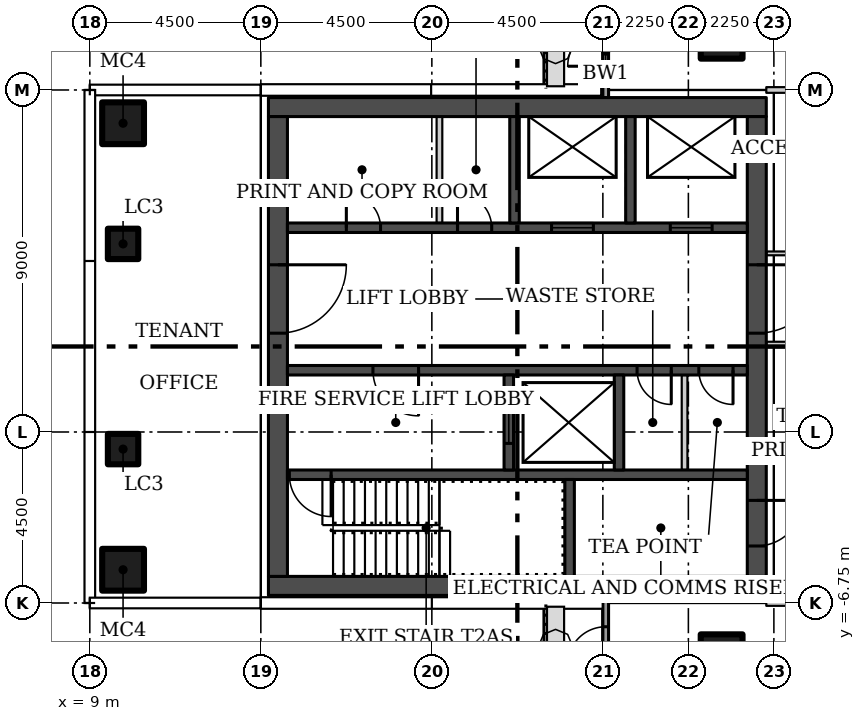
"""IFC4 building model, lengths in metres.
Left out: names, types, materials, properties, quantities, classifications, styles, units other than length and angle.
Written with IfcOpenShell. Run it as: python <this file> out.ifc"""

import sys

from ifc_helpers import new_model, si_unit, direction, frame, frame_2d, origin, origin_2d, place, context, subcontext, project, spatial, rectangle, hollow_rectangle, extrude, element, fill, save


model = new_model("IFC4")
c1 = context("Model", 3, precision=1e-05, world=origin(), true_north=direction((0.0, 1.0)))
c2 = subcontext(c1, "Body", "Model", "MODEL_VIEW")
j1 = project(units=[si_unit("LENGTHUNIT", "METRE"), si_unit("PLANEANGLEUNIT", "RADIAN")], contexts=[c1])
p1 = place(None, origin())
s1 = spatial("IfcSite", under=j1, at=p1, CompositionType="ELEMENT")
p2 = place(p1, origin())
s2 = spatial("IfcBuilding", under=s1, at=p2, CompositionType="ELEMENT")
p3 = place(p2, frame((0.0, 0.0, 170.1)))
s3 = spatial("IfcBuildingStorey", under=s2, at=p3, CompositionType="ELEMENT", Elevation=170.1)
for number, where in (
    (1, (25.625, 8.125, 0.0)),
    (2, (25.625, -8.125, 0.0)),
    (3, (9.875, -5.875, 0.0)),
    (4, (9.875, 5.875, 0.0)),
):
    element("IfcColumn", number, at=place(p3, frame(where)), inside=s3, PredefinedType="COLUMN", context=c2, shape_type="SweptSolid", body=[
        extrude(hollow_rectangle(XDim=1.1, YDim=1.1, WallThickness=0.04, at=origin_2d()), origin(), (0.0, 0.0, 1.0), 3.55),
    ])
for number, where in (
    (5, (9.875, -2.7, 0.0)),
    (6, (9.875, 2.7, 0.0)),
):
    element("IfcColumn", number, at=place(p3, frame(where)), inside=s3, PredefinedType="COLUMN", context=c2, shape_type="SweptSolid", body=[
        extrude(hollow_rectangle(XDim=0.8, YDim=0.8, WallThickness=0.03, at=origin_2d()), origin(), (0.0, 0.0, 1.0), 3.55),
    ])
p4 = place(p3, frame((26.8, 2.45, 0.0)))
e7 = element("IfcWall", 7, at=p4, inside=s3, PredefinedType="PARTITIONING", context=c2, shape_type="SweptSolid", body=[
    extrude(rectangle(XDim=5.875, YDim=0.1, at=frame_2d((2.938, 0.0))), origin(), (0.0, 0.0, 1.0), 3.55),
])
p5 = place(p4, frame((3.812, 0.0, 0.0)))
e8 = element("IfcOpeningElement", 8, at=p5, cuts=e7, PredefinedType="OPENING", context=c2, shape_type="SweptSolid", body=[
    extrude(rectangle(XDim=0.9, YDim=2.1, at=frame_2d((0.45, 1.05))), frame((0.0, 0.06, 0.0), z_axis=(0.0, -1.0, 0.0), x_axis=(1.0, 0.0, 0.0)), (0.0, 0.0, 1.0), 0.12),
])
p6 = place(p4, frame((1.0, 0.0, 0.0)))
e9 = element("IfcOpeningElement", 9, at=p6, cuts=e7, PredefinedType="OPENING", context=c2, shape_type="SweptSolid", body=[
    extrude(rectangle(XDim=0.9, YDim=2.1, at=frame_2d((0.45, 1.05))), frame((0.0, 0.06, 0.0), z_axis=(0.0, -1.0, 0.0), x_axis=(1.0, 0.0, 0.0)), (0.0, 0.0, 1.0), 0.12),
])
p7 = place(p3, frame((32.7, 0.05, 0.0), z_axis=(0.0, 0.0, 1.0), x_axis=(-1.0, 0.0, 0.0)))
e10 = element("IfcWall", 10, at=p7, inside=s3, PredefinedType="PARTITIONING", context=c2, shape_type="SweptSolid", body=[
    extrude(rectangle(XDim=5.9, YDim=0.15, at=frame_2d((2.95, 0.0))), origin(), (0.0, 0.0, 1.0), 3.55),
])
p8 = place(p3, frame((32.675, 6.75, 0.0), z_axis=(0.0, 0.0, 1.0), x_axis=(-1.0, 0.0, 0.0)))
e11 = element("IfcWall", 11, at=p8, inside=s3, PredefinedType="PARTITIONING", context=c2, shape_type="SweptSolid", body=[
    extrude(rectangle(XDim=5.875, YDim=0.15, at=frame_2d((2.938, 0.0))), origin(), (0.0, 0.0, 1.0), 3.55),
])
p9 = place(p3, frame((26.8, -6.75, 0.0)))
e12 = element("IfcWall", 12, at=p9, inside=s3, PredefinedType="PARTITIONING", context=c2, shape_type="SweptSolid", body=[
    extrude(rectangle(XDim=5.75, YDim=0.15, at=frame_2d((2.875, 0.0))), origin(), (0.0, 0.0, 1.0), 3.55),
])
p10 = place(p3, frame((22.575, 6.543, 0.0), z_axis=(0.0, 0.0, 1.0), x_axis=(0.0, 1.0, 0.0)))
e13 = element("IfcWall", 13, at=p10, inside=s3, PredefinedType="SOLIDWALL", context=c2, shape_type="SweptSolid", body=[
    extrude(rectangle(XDim=2.457, YDim=0.15, at=frame_2d((1.229, 0.0))), origin(), (0.0, 0.0, 1.0), 3.45),
])
p11 = place(p10, frame((0.832, 0.0, 0.0)))
e14 = element("IfcOpeningElement", 14, at=p11, cuts=e13, PredefinedType="OPENING", context=c2, shape_type="SweptSolid", body=[
    extrude(rectangle(XDim=1.0, YDim=2.4, at=frame_2d((0.5, 1.2))), frame((0.0, 0.085, 0.0), z_axis=(0.0, -1.0, 0.0), x_axis=(1.0, 0.0, 0.0)), (0.0, 0.0, 1.0), 0.17),
])
p12 = place(p3, frame((22.575, -9.0, 0.0), z_axis=(0.0, 0.0, 1.0), x_axis=(0.0, 1.0, 0.0)))
e15 = element("IfcWall", 15, at=p12, inside=s3, PredefinedType="SOLIDWALL", context=c2, shape_type="SweptSolid", body=[
    extrude(rectangle(XDim=2.457, YDim=0.15, at=frame_2d((1.229, 0.0))), origin(), (0.0, 0.0, 1.0), 3.45),
])
p13 = place(p12, frame((0.625, 0.0, 0.0)))
e16 = element("IfcOpeningElement", 16, at=p13, cuts=e15, PredefinedType="OPENING", context=c2, shape_type="SweptSolid", body=[
    extrude(rectangle(XDim=1.0, YDim=2.4, at=frame_2d((0.5, 1.2))), frame((0.0, 0.085, 0.0), z_axis=(0.0, -1.0, 0.0), x_axis=(1.0, 0.0, 0.0)), (0.0, 0.0, 1.0), 0.17),
])
for number, where in (
    (17, (13.7, -6.3, 0.0)),
    (18, (13.7, 6.3, 0.0)),
):
    element("IfcWall", number, at=place(p3, frame(where)), inside=s3, PredefinedType="SHEAR", context=c2, shape_type="SweptSolid", body=[
        extrude(rectangle(XDim=13.1, YDim=0.5, at=frame_2d((6.55, 0.0))), origin(), (0.0, 0.0, 1.0), 3.55),
    ])
p14 = place(p3, frame((13.95, 6.05, 0.0), z_axis=(0.0, 0.0, 1.0), x_axis=(0.0, -1.0, 0.0)))
e19 = element("IfcWall", 19, at=p14, inside=s3, PredefinedType="SHEAR", context=c2, shape_type="SweptSolid", body=[
    extrude(rectangle(XDim=12.1, YDim=0.5, at=frame_2d((6.05, 0.0))), origin(), (0.0, 0.0, 1.0), 3.55),
])
p15 = place(p14, frame((3.9, 0.0, 0.0)))
e20 = element("IfcOpeningElement", 20, at=p15, cuts=e19, PredefinedType="OPENING", context=c2, shape_type="SweptSolid", body=[
    extrude(rectangle(XDim=1.8, YDim=2.4, at=frame_2d((0.9, 1.2))), frame((0.0, 0.26, 0.0), z_axis=(0.0, -1.0, 0.0), x_axis=(1.0, 0.0, 0.0)), (0.0, 0.0, 1.0), 0.52),
])
p16 = place(p3, frame((26.55, 6.05, 0.0), z_axis=(0.0, 0.0, 1.0), x_axis=(0.0, -1.0, 0.0)))
e21 = element("IfcWall", 21, at=p16, inside=s3, PredefinedType="SHEAR", context=c2, shape_type="SweptSolid", body=[
    extrude(rectangle(XDim=12.1, YDim=0.5, at=frame_2d((6.05, 0.0))), origin(), (0.0, 0.0, 1.0), 3.55),
])
p17 = place(p16, frame((10.1, 0.0, 0.0)))
e22 = element("IfcOpeningElement", 22, at=p17, cuts=e21, PredefinedType="OPENING", context=c2, shape_type="SweptSolid", body=[
    extrude(rectangle(XDim=1.2, YDim=2.1, at=frame_2d((0.6, 1.05))), frame((0.0, 0.26, 0.0), z_axis=(0.0, -1.0, 0.0), x_axis=(1.0, 0.0, 0.0)), (0.0, 0.0, 1.0), 0.52),
])
p18 = place(p16, frame((3.9, 0.0, 0.0)))
e23 = element("IfcOpeningElement", 23, at=p18, cuts=e21, PredefinedType="OPENING", context=c2, shape_type="SweptSolid", body=[
    extrude(rectangle(XDim=1.8, YDim=2.4, at=frame_2d((0.9, 1.2))), frame((0.0, 0.26, 0.0), z_axis=(0.0, -1.0, 0.0), x_axis=(1.0, 0.0, 0.0)), (0.0, 0.0, 1.0), 0.52),
])
p19 = place(p3, frame((26.3, -3.375, 0.0), z_axis=(0.0, 0.0, 1.0), x_axis=(-1.0, 0.0, 0.0)))
e24 = element("IfcWall", 24, at=p19, inside=s3, PredefinedType="SHEAR", context=c2, shape_type="SweptSolid", body=[
    extrude(rectangle(XDim=12.1, YDim=0.25, at=frame_2d((6.05, 0.0))), origin(), (0.0, 0.0, 1.0), 3.55),
])
p20 = place(p19, frame((10.95, 0.0, 0.0)))
e25 = element("IfcOpeningElement", 25, at=p20, cuts=e24, PredefinedType="OPENING", context=c2, shape_type="SweptSolid", body=[
    extrude(rectangle(XDim=1.1, YDim=2.1, at=frame_2d((0.55, 1.05))), frame((0.0, 0.135, 0.0), z_axis=(0.0, -1.0, 0.0), x_axis=(1.0, 0.0, 0.0)), (0.0, 0.0, 1.0), 0.27),
])
p21 = place(p3, frame((21.625, -6.05, 0.0), z_axis=(0.0, 0.0, 1.0), x_axis=(0.0, 1.0, 0.0)))
e26 = element("IfcWall", 26, at=p21, inside=s3, PredefinedType="SHEAR", context=c2, shape_type="SweptSolid", body=[
    extrude(rectangle(XDim=2.55, YDim=0.25, at=frame_2d((1.275, 0.0))), origin(), (0.0, 0.0, 1.0), 3.55),
])
p22 = place(p3, frame((26.3, -0.625, 0.0), z_axis=(0.0, 0.0, 1.0), x_axis=(-1.0, 0.0, 0.0)))
e27 = element("IfcWall", 27, at=p22, inside=s3, PredefinedType="SHEAR", context=c2, shape_type="SweptSolid", body=[
    extrude(rectangle(XDim=12.1, YDim=0.25, at=frame_2d((6.05, 0.0))), origin(), (0.0, 0.0, 1.0), 3.55),
])
p23 = place(p22, frame((8.65, 0.0, 0.0)))
e28 = element("IfcOpeningElement", 28, at=p23, cuts=e27, PredefinedType="OPENING", context=c2, shape_type="SweptSolid", body=[
    extrude(rectangle(XDim=1.2, YDim=2.1, at=frame_2d((0.6, 1.05))), frame((0.0, 0.135, 0.0), z_axis=(0.0, -1.0, 0.0), x_axis=(1.0, 0.0, 0.0)), (0.0, 0.0, 1.0), 0.27),
])
p24 = place(p22, frame((2.0, 0.0, 0.0)))
e29 = element("IfcOpeningElement", 29, at=p24, cuts=e27, PredefinedType="OPENING", context=c2, shape_type="SweptSolid", body=[
    extrude(rectangle(XDim=0.9, YDim=2.1, at=frame_2d((0.45, 1.05))), frame((0.0, 0.135, 0.0), z_axis=(0.0, -1.0, 0.0), x_axis=(1.0, 0.0, 0.0)), (0.0, 0.0, 1.0), 0.27),
])
p25 = place(p22, frame((0.375, 0.0, 0.0)))
e30 = element("IfcOpeningElement", 30, at=p25, cuts=e27, PredefinedType="OPENING", context=c2, shape_type="SweptSolid", body=[
    extrude(rectangle(XDim=0.9, YDim=2.1, at=frame_2d((0.45, 1.05))), frame((0.0, 0.135, 0.0), z_axis=(0.0, -1.0, 0.0), x_axis=(1.0, 0.0, 0.0)), (0.0, 0.0, 1.0), 0.27),
])
p26 = place(p3, frame((20.025, -3.25, 0.0), z_axis=(0.0, 0.0, 1.0), x_axis=(0.0, 1.0, 0.0)))
e31 = element("IfcWall", 31, at=p26, inside=s3, PredefinedType="SHEAR", context=c2, shape_type="SweptSolid", body=[
    extrude(rectangle(XDim=2.5, YDim=0.25, at=frame_2d((1.25, 0.0))), origin(), (0.0, 0.0, 1.0), 3.55),
])
p27 = place(p26, frame((0.7, 0.0, 0.0)))
e32 = element("IfcOpeningElement", 32, at=p27, cuts=e31, PredefinedType="OPENING", context=c2, shape_type="SweptSolid", body=[
    extrude(rectangle(XDim=1.1, YDim=2.1, at=frame_2d((0.55, 1.05))), frame((0.0, 0.135, 0.0), z_axis=(0.0, -1.0, 0.0), x_axis=(1.0, 0.0, 0.0)), (0.0, 0.0, 1.0), 0.27),
])
p28 = place(p3, frame((22.925, -3.25, 0.0), z_axis=(0.0, 0.0, 1.0), x_axis=(0.0, 1.0, 0.0)))
e33 = element("IfcWall", 33, at=p28, inside=s3, PredefinedType="SHEAR", context=c2, shape_type="SweptSolid", body=[
    extrude(rectangle(XDim=2.5, YDim=0.25, at=frame_2d((1.25, 0.0))), origin(), (0.0, 0.0, 1.0), 3.55),
])
p29 = place(p3, frame((24.65, -3.25, 0.0), z_axis=(0.0, 0.0, 1.0), x_axis=(0.0, 1.0, 0.0)))
e34 = element("IfcWall", 34, at=p29, inside=s3, PredefinedType="PARTITIONING", context=c2, shape_type="SweptSolid", body=[
    extrude(rectangle(XDim=2.5, YDim=0.15, at=frame_2d((1.25, 0.0))), origin(), (0.0, 0.0, 1.0), 3.55),
])
p30 = place(p3, frame((14.2, 3.125, 0.0)))
e35 = element("IfcWall", 35, at=p30, inside=s3, PredefinedType="SHEAR", context=c2, shape_type="SweptSolid", body=[
    extrude(rectangle(XDim=12.1, YDim=0.25, at=frame_2d((6.05, 0.0))), origin(), (0.0, 0.0, 1.0), 3.55),
])
p31 = place(p30, frame((6.95, 0.0, 0.0)))
e36 = element("IfcOpeningElement", 36, at=p31, cuts=e35, PredefinedType="OPENING", context=c2, shape_type="SweptSolid", body=[
    extrude(rectangle(XDim=1.1, YDim=2.1, at=frame_2d((0.55, 1.05))), frame((0.0, 0.135, 0.0), z_axis=(0.0, -1.0, 0.0), x_axis=(1.0, 0.0, 0.0)), (0.0, 0.0, 1.0), 0.27),
])
p32 = place(p30, frame((10.075, 0.0, 0.0)))
e37 = element("IfcOpeningElement", 37, at=p32, cuts=e35, PredefinedType="OPENING", context=c2, shape_type="SweptSolid", body=[
    extrude(rectangle(XDim=1.1, YDim=2.1, at=frame_2d((0.55, 1.05))), frame((0.0, 0.135, 0.0), z_axis=(0.0, -1.0, 0.0), x_axis=(1.0, 0.0, 0.0)), (0.0, 0.0, 1.0), 0.27),
])
p33 = place(p30, frame((1.55, 0.0, 0.0)))
e38 = element("IfcOpeningElement", 38, at=p33, cuts=e35, PredefinedType="OPENING", context=c2, shape_type="SweptSolid", body=[
    extrude(rectangle(XDim=0.9, YDim=2.1, at=frame_2d((0.45, 1.05))), frame((0.0, 0.135, 0.0), z_axis=(0.0, -1.0, 0.0), x_axis=(1.0, 0.0, 0.0)), (0.0, 0.0, 1.0), 0.27),
])
p34 = place(p30, frame((4.475, 0.0, 0.0)))
e39 = element("IfcOpeningElement", 39, at=p34, cuts=e35, PredefinedType="OPENING", context=c2, shape_type="SweptSolid", body=[
    extrude(rectangle(XDim=0.9, YDim=2.1, at=frame_2d((0.45, 1.05))), frame((0.0, 0.135, 0.0), z_axis=(0.0, -1.0, 0.0), x_axis=(1.0, 0.0, 0.0)), (0.0, 0.0, 1.0), 0.27),
])
for number, where, z_axis, x_axis in (
    (40, (20.175, 3.25, 0.0), (0.0, 0.0, 1.0), (0.0, 1.0, 0.0)),
    (41, (23.225, 3.25, 0.0), (0.0, 0.0, 1.0), (0.0, 1.0, 0.0)),
):
    element("IfcWall", number, at=place(p3, frame(where, z_axis=z_axis, x_axis=x_axis)), inside=s3, PredefinedType="SHEAR", context=c2, shape_type="SweptSolid", body=[
        extrude(rectangle(XDim=2.8, YDim=0.25, at=frame_2d((1.4, 0.0))), origin(), (0.0, 0.0, 1.0), 3.55),
    ])
p35 = place(p3, frame((18.2, 3.25, 0.0), z_axis=(0.0, 0.0, 1.0), x_axis=(0.0, 1.0, 0.0)))
e42 = element("IfcWall", 42, at=p35, inside=s3, PredefinedType="PARTITIONING", context=c2, shape_type="SweptSolid", body=[
    extrude(rectangle(XDim=2.8, YDim=0.15, at=frame_2d((1.4, 0.0))), origin(), (0.0, 0.0, 1.0), 3.55),
])
p36 = place(p11, origin())
e43 = element("IfcDoor", 43, at=p36, inside=s3, OperationType="SINGLE_SWING_LEFT", PredefinedType="DOOR", context=c2, shape_type="SweptSolid", body=[
    extrude(rectangle(XDim=1.0, YDim=2.4, at=frame_2d((0.5, 1.2))), frame((0.0, 0.025, 0.0), z_axis=(0.0, -1.0, 0.0), x_axis=(1.0, 0.0, 0.0)), (0.0, 0.0, 1.0), 0.05),
])
fill(e14, e43)
p37 = place(p13, origin())
e44 = element("IfcDoor", 44, at=p37, inside=s3, OperationType="SINGLE_SWING_LEFT", PredefinedType="DOOR", context=c2, shape_type="SweptSolid", body=[
    extrude(rectangle(XDim=1.0, YDim=2.4, at=frame_2d((0.5, 1.2))), frame((0.0, 0.025, 0.0), z_axis=(0.0, -1.0, 0.0), x_axis=(1.0, 0.0, 0.0)), (0.0, 0.0, 1.0), 0.05),
])
fill(e16, e44)
p38 = place(p15, origin())
e45 = element("IfcDoor", 45, at=p38, inside=s3, OperationType="DOUBLE_DOOR_SINGLE_SWING", PredefinedType="DOOR", context=c2, shape_type="SweptSolid", body=[
    extrude(rectangle(XDim=1.8, YDim=2.4, at=frame_2d((0.9, 1.2))), frame((0.0, 0.025, 0.0), z_axis=(0.0, -1.0, 0.0), x_axis=(1.0, 0.0, 0.0)), (0.0, 0.0, 1.0), 0.05),
])
fill(e20, e45)
p39 = place(p17, origin())
e46 = element("IfcDoor", 46, at=p39, inside=s3, OperationType="SINGLE_SWING_RIGHT", PredefinedType="DOOR", context=c2, shape_type="SweptSolid", body=[
    extrude(rectangle(XDim=1.2, YDim=2.1, at=frame_2d((0.6, 1.05))), frame((0.0, 0.025, 0.0), z_axis=(0.0, -1.0, 0.0), x_axis=(1.0, 0.0, 0.0)), (0.0, 0.0, 1.0), 0.05),
])
fill(e22, e46)
p40 = place(p18, origin())
e47 = element("IfcDoor", 47, at=p40, inside=s3, OperationType="DOUBLE_DOOR_SINGLE_SWING", PredefinedType="DOOR", context=c2, shape_type="SweptSolid", body=[
    extrude(rectangle(XDim=1.8, YDim=2.4, at=frame_2d((0.9, 1.2))), frame((0.0, 0.025, 0.0), z_axis=(0.0, -1.0, 0.0), x_axis=(1.0, 0.0, 0.0)), (0.0, 0.0, 1.0), 0.05),
])
fill(e23, e47)
p41 = place(p20, origin())
e48 = element("IfcDoor", 48, at=p41, inside=s3, OperationType="SINGLE_SWING_RIGHT", PredefinedType="DOOR", context=c2, shape_type="SweptSolid", body=[
    extrude(rectangle(XDim=1.1, YDim=2.1, at=frame_2d((0.55, 1.05))), frame((0.0, 0.025, 0.0), z_axis=(0.0, -1.0, 0.0), x_axis=(1.0, 0.0, 0.0)), (0.0, 0.0, 1.0), 0.05),
])
fill(e25, e48)
p42 = place(p23, origin())
e49 = element("IfcDoor", 49, at=p42, inside=s3, OperationType="SINGLE_SWING_RIGHT", PredefinedType="DOOR", context=c2, shape_type="SweptSolid", body=[
    extrude(rectangle(XDim=1.2, YDim=2.1, at=frame_2d((0.6, 1.05))), frame((0.0, 0.025, 0.0), z_axis=(0.0, -1.0, 0.0), x_axis=(1.0, 0.0, 0.0)), (0.0, 0.0, 1.0), 0.05),
])
fill(e28, e49)
p43 = place(p24, origin())
e50 = element("IfcDoor", 50, at=p43, inside=s3, OperationType="SINGLE_SWING_LEFT", PredefinedType="DOOR", context=c2, shape_type="SweptSolid", body=[
    extrude(rectangle(XDim=0.9, YDim=2.1, at=frame_2d((0.45, 1.05))), frame((0.0, 0.025, 0.0), z_axis=(0.0, -1.0, 0.0), x_axis=(1.0, 0.0, 0.0)), (0.0, 0.0, 1.0), 0.05),
])
fill(e29, e50)
p44 = place(p25, origin())
e51 = element("IfcDoor", 51, at=p44, inside=s3, OperationType="SINGLE_SWING_LEFT", PredefinedType="DOOR", context=c2, shape_type="SweptSolid", body=[
    extrude(rectangle(XDim=0.9, YDim=2.1, at=frame_2d((0.45, 1.05))), frame((0.0, 0.025, 0.0), z_axis=(0.0, -1.0, 0.0), x_axis=(1.0, 0.0, 0.0)), (0.0, 0.0, 1.0), 0.05),
])
fill(e30, e51)
p45 = place(p27, origin())
e52 = element("IfcDoor", 52, at=p45, inside=s3, OperationType="SLIDING_TO_LEFT", PredefinedType="DOOR", context=c2, shape_type="SweptSolid", body=[
    extrude(rectangle(XDim=1.1, YDim=2.1, at=frame_2d((0.55, 1.05))), frame((0.0, 0.025, 0.0), z_axis=(0.0, -1.0, 0.0), x_axis=(1.0, 0.0, 0.0)), (0.0, 0.0, 1.0), 0.05),
])
fill(e32, e52)
p46 = place(p31, origin())
e53 = element("IfcDoor", 53, at=p46, inside=s3, OperationType="SLIDING_TO_LEFT", PredefinedType="DOOR", context=c2, shape_type="SweptSolid", body=[
    extrude(rectangle(XDim=1.1, YDim=2.1, at=frame_2d((0.55, 1.05))), frame((0.0, 0.025, 0.0), z_axis=(0.0, -1.0, 0.0), x_axis=(1.0, 0.0, 0.0)), (0.0, 0.0, 1.0), 0.05),
])
fill(e36, e53)
p47 = place(p32, origin())
e54 = element("IfcDoor", 54, at=p47, inside=s3, OperationType="SLIDING_TO_LEFT", PredefinedType="DOOR", context=c2, shape_type="SweptSolid", body=[
    extrude(rectangle(XDim=1.1, YDim=2.1, at=frame_2d((0.55, 1.05))), frame((0.0, 0.025, 0.0), z_axis=(0.0, -1.0, 0.0), x_axis=(1.0, 0.0, 0.0)), (0.0, 0.0, 1.0), 0.05),
])
fill(e37, e54)
p48 = place(p33, origin())
e55 = element("IfcDoor", 55, at=p48, inside=s3, OperationType="SINGLE_SWING_LEFT", PredefinedType="DOOR", context=c2, shape_type="SweptSolid", body=[
    extrude(rectangle(XDim=0.9, YDim=2.1, at=frame_2d((0.45, 1.05))), frame((0.0, 0.025, 0.0), z_axis=(0.0, -1.0, 0.0), x_axis=(1.0, 0.0, 0.0)), (0.0, 0.0, 1.0), 0.05),
])
fill(e38, e55)
p49 = place(p34, origin())
e56 = element("IfcDoor", 56, at=p49, inside=s3, OperationType="SINGLE_SWING_LEFT", PredefinedType="DOOR", context=c2, shape_type="SweptSolid", body=[
    extrude(rectangle(XDim=0.9, YDim=2.1, at=frame_2d((0.45, 1.05))), frame((0.0, 0.025, 0.0), z_axis=(0.0, -1.0, 0.0), x_axis=(1.0, 0.0, 0.0)), (0.0, 0.0, 1.0), 0.05),
])
fill(e39, e56)
save(model, sys.argv[1])
